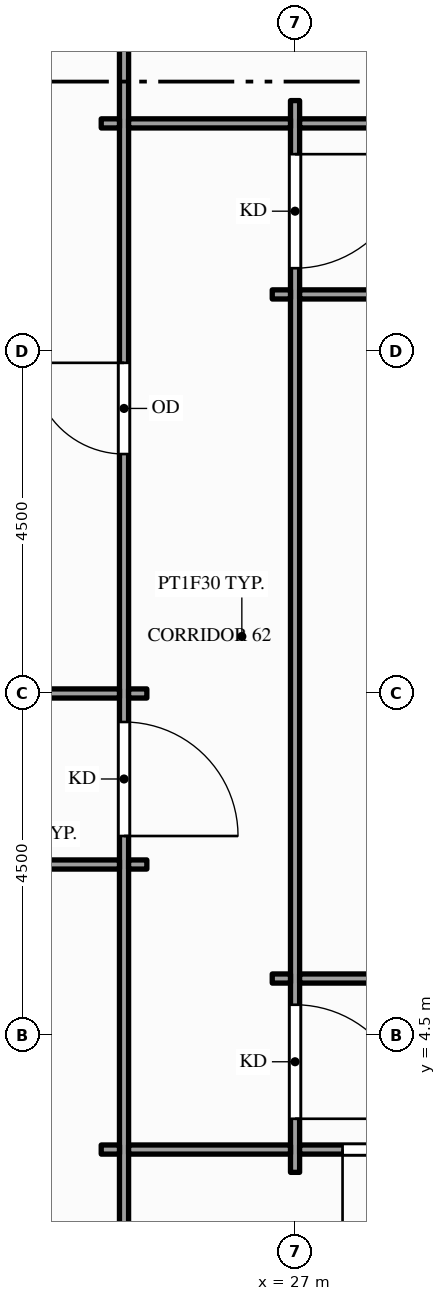
"""IFC4 building model, lengths in metres.
Left out: names, types, materials, properties, quantities, classifications, styles, units other than length and angle.
Written with IfcOpenShell. Run it as: python <this file> out.ifc"""

import sys

from ifc_helpers import new_model, si_unit, direction, frame, frame_2d, origin, place, context, subcontext, project, spatial, rectangle, extrude, element, fill, save


model = new_model("IFC4")
c1 = context("Model", 3, precision=1e-05, world=origin(), true_north=direction((0.0, 1.0)))
c2 = subcontext(c1, "Body", "Model", "MODEL_VIEW")
j1 = project(units=[si_unit("LENGTHUNIT", "METRE"), si_unit("PLANEANGLEUNIT", "RADIAN")], contexts=[c1])
p1 = place(None, origin())
s1 = spatial("IfcSite", under=j1, at=p1, CompositionType="ELEMENT")
p2 = place(p1, origin())
s2 = spatial("IfcBuilding", under=s1, at=p2, CompositionType="ELEMENT")
p3 = place(p2, frame((0.0, 0.0, 215.0)))
s3 = spatial("IfcBuildingStorey", under=s2, at=p3, CompositionType="ELEMENT", Elevation=215.0)
p4 = place(p3, frame((24.75, -1.35, 0.0), z_axis=(0.0, 0.0, 1.0), x_axis=(0.0, 1.0, 0.0)))
e1 = element("IfcWall", 1, at=p4, inside=s3, PredefinedType="PARTITIONING", context=c2, shape_type="SweptSolid", body=[
    extrude(rectangle(XDim=24.101, YDim=0.12, at=frame_2d((12.05, 0.0))), origin(), (0.0, 0.0, 1.0), 2.76),
])
p5 = place(p4, frame((8.475, 0.0, 0.0)))
e2 = element("IfcOpeningElement", 2, at=p5, cuts=e1, PredefinedType="OPENING", context=c2, shape_type="SweptSolid", body=[
    extrude(rectangle(XDim=1.5, YDim=2.1, at=frame_2d((0.75, 1.05))), frame((0.0, 0.07, 0.0), z_axis=(0.0, -1.0, 0.0), x_axis=(1.0, 0.0, 0.0)), (0.0, 0.0, 1.0), 0.14),
])
p6 = place(p4, frame((13.5, 0.0, 0.0)))
e3 = element("IfcOpeningElement", 3, at=p6, cuts=e1, PredefinedType="OPENING", context=c2, shape_type="SweptSolid", body=[
    extrude(rectangle(XDim=1.2, YDim=2.1, at=frame_2d((0.6, 1.05))), frame((0.0, 0.07, 0.0), z_axis=(0.0, -1.0, 0.0), x_axis=(1.0, 0.0, 0.0)), (0.0, 0.0, 1.0), 0.14),
])
p7 = place(p3, frame((27.0, 2.7, 0.0), z_axis=(0.0, 0.0, 1.0), x_axis=(0.0, 1.0, 0.0)))
e4 = element("IfcWall", 4, at=p7, inside=s3, PredefinedType="PARTITIONING", context=c2, shape_type="SweptSolid", body=[
    extrude(rectangle(XDim=14.1, YDim=0.12, at=frame_2d((7.05, 0.0))), origin(), (0.0, 0.0, 1.0), 2.87),
])
p8 = place(p7, frame((0.705, 0.0, 0.0)))
e5 = element("IfcOpeningElement", 5, at=p8, cuts=e4, PredefinedType="OPENING", context=c2, shape_type="SweptSolid", body=[
    extrude(rectangle(XDim=1.5, YDim=2.1, at=frame_2d((0.75, 1.05))), frame((0.0, 0.07, 0.0), z_axis=(0.0, -1.0, 0.0), x_axis=(1.0, 0.0, 0.0)), (0.0, 0.0, 1.0), 0.14),
])
p9 = place(p7, frame((11.895, 0.0, 0.0)))
e6 = element("IfcOpeningElement", 6, at=p9, cuts=e4, PredefinedType="OPENING", context=c2, shape_type="SweptSolid", body=[
    extrude(rectangle(XDim=1.5, YDim=2.1, at=frame_2d((0.75, 1.05))), frame((0.0, 0.07, 0.0), z_axis=(0.0, -1.0, 0.0), x_axis=(1.0, 0.0, 0.0)), (0.0, 0.0, 1.0), 0.14),
])
p10 = place(p3, frame((24.45, 3.0, 0.0), z_axis=(0.0, 0.0, 1.0), x_axis=(1.0, 0.0, 0.0)))
e7 = element("IfcWall", 7, at=p10, inside=s3, PredefinedType="PARTITIONING", context=c2, shape_type="SweptSolid", body=[
    extrude(rectangle(XDim=0.24, YDim=0.12, at=frame_2d((0.12, 0.0))), origin(), (0.0, 0.0, 1.0), 2.76),
])
p11 = place(p3, frame((24.81, 3.0, 0.0), z_axis=(0.0, 0.0, 1.0), x_axis=(1.0, 0.0, 0.0)))
e8 = element("IfcWall", 8, at=p11, inside=s3, PredefinedType="PARTITIONING", context=c2, shape_type="SweptSolid", body=[
    extrude(rectangle(XDim=2.13, YDim=0.12, at=frame_2d((1.065, 0.0))), origin(), (0.0, 0.0, 1.0), 2.76),
])
p12 = place(p3, frame((27.06, 3.0, 0.0), z_axis=(0.0, 0.0, 1.0), x_axis=(1.0, 0.0, 0.0)))
e9 = element("IfcWall", 9, at=p12, inside=s3, PredefinedType="PARTITIONING", context=c2, shape_type="SweptSolid", body=[
    extrude(rectangle(XDim=2.13, YDim=0.12, at=frame_2d((1.065, 0.0))), origin(), (0.0, 0.0, 1.0), 2.87),
])
p13 = place(p12, frame((0.565, 0.0, 0.0)))
e10 = element("IfcOpeningElement", 10, at=p13, cuts=e9, PredefinedType="OPENING", context=c2, shape_type="SweptSolid", body=[
    extrude(rectangle(XDim=1.0, YDim=2.1, at=frame_2d((0.5, 1.05))), frame((0.0, 0.07, 0.0), z_axis=(0.0, -1.0, 0.0), x_axis=(1.0, 0.0, 0.0)), (0.0, 0.0, 1.0), 0.14),
])
p14 = place(p3, frame((26.7, 5.25, 0.0), z_axis=(0.0, 0.0, 1.0), x_axis=(1.0, 0.0, 0.0)))
e11 = element("IfcWall", 11, at=p14, inside=s3, PredefinedType="PARTITIONING", context=c2, shape_type="SweptSolid", body=[
    extrude(rectangle(XDim=0.24, YDim=0.12, at=frame_2d((0.12, 0.0))), origin(), (0.0, 0.0, 1.0), 2.87),
])
p15 = place(p3, frame((27.06, 5.25, 0.0), z_axis=(0.0, 0.0, 1.0), x_axis=(1.0, 0.0, 0.0)))
e12 = element("IfcWall", 12, at=p15, inside=s3, PredefinedType="PARTITIONING", context=c2, shape_type="SweptSolid", body=[
    extrude(rectangle(XDim=4.38, YDim=0.12, at=frame_2d((2.19, 0.0))), origin(), (0.0, 0.0, 1.0), 2.87),
])
p16 = place(p15, frame((1.69, 0.0, 0.0)))
e13 = element("IfcOpeningElement", 13, at=p16, cuts=e12, PredefinedType="OPENING", context=c2, shape_type="SweptSolid", body=[
    extrude(rectangle(XDim=1.0, YDim=2.1, at=frame_2d((0.5, 1.05))), frame((0.0, 0.07, 0.0), z_axis=(0.0, -1.0, 0.0), x_axis=(1.0, 0.0, 0.0)), (0.0, 0.0, 1.0), 0.14),
])
p17 = place(p3, frame((18.06, 6.75, 0.0), z_axis=(0.0, 0.0, 1.0), x_axis=(1.0, 0.0, 0.0)))
e14 = element("IfcWall", 14, at=p17, inside=s3, PredefinedType="PARTITIONING", context=c2, shape_type="SweptSolid", body=[
    extrude(rectangle(XDim=6.63, YDim=0.12, at=frame_2d((3.315, 0.0))), origin(), (0.0, 0.0, 1.0), 2.76),
])
p18 = place(p17, frame((2.865, 0.0, 0.0)))
e15 = element("IfcOpeningElement", 15, at=p18, cuts=e14, PredefinedType="OPENING", context=c2, shape_type="SweptSolid", body=[
    extrude(rectangle(XDim=0.9, YDim=2.1, at=frame_2d((0.45, 1.05))), frame((0.0, 0.07, 0.0), z_axis=(0.0, -1.0, 0.0), x_axis=(1.0, 0.0, 0.0)), (0.0, 0.0, 1.0), 0.14),
])
p19 = place(p3, frame((24.81, 6.75, 0.0), z_axis=(0.0, 0.0, 1.0), x_axis=(1.0, 0.0, 0.0)))
e16 = element("IfcWall", 16, at=p19, inside=s3, PredefinedType="PARTITIONING", context=c2, shape_type="SweptSolid", body=[
    extrude(rectangle(XDim=0.24, YDim=0.12, at=frame_2d((0.12, 0.0))), origin(), (0.0, 0.0, 1.0), 2.76),
])
p20 = place(p3, frame((11.31, 9.0, 0.0), z_axis=(0.0, 0.0, 1.0), x_axis=(1.0, 0.0, 0.0)))
e17 = element("IfcWall", 17, at=p20, inside=s3, PredefinedType="PARTITIONING", context=c2, shape_type="SweptSolid", body=[
    extrude(rectangle(XDim=13.38, YDim=0.12, at=frame_2d((6.69, 0.0))), origin(), (0.0, 0.0, 1.0), 2.76),
])
p21 = place(p20, frame((3.54, 0.0, 0.0)))
e18 = element("IfcOpeningElement", 18, at=p21, cuts=e17, PredefinedType="OPENING", context=c2, shape_type="SweptSolid", body=[
    extrude(rectangle(XDim=1.8, YDim=2.1, at=frame_2d((0.9, 1.05))), frame((0.0, 0.07, 0.0), z_axis=(0.0, -1.0, 0.0), x_axis=(1.0, 0.0, 0.0)), (0.0, 0.0, 1.0), 0.14),
])
p22 = place(p3, frame((24.81, 9.0, 0.0), z_axis=(0.0, 0.0, 1.0), x_axis=(1.0, 0.0, 0.0)))
e19 = element("IfcWall", 19, at=p22, inside=s3, PredefinedType="PARTITIONING", context=c2, shape_type="SweptSolid", body=[
    extrude(rectangle(XDim=0.24, YDim=0.12, at=frame_2d((0.12, 0.0))), origin(), (0.0, 0.0, 1.0), 2.76),
])
p23 = place(p3, frame((26.7, 14.25, 0.0), z_axis=(0.0, 0.0, 1.0), x_axis=(1.0, 0.0, 0.0)))
e20 = element("IfcWall", 20, at=p23, inside=s3, PredefinedType="PARTITIONING", context=c2, shape_type="SweptSolid", body=[
    extrude(rectangle(XDim=0.24, YDim=0.12, at=frame_2d((0.12, 0.0))), origin(), (0.0, 0.0, 1.0), 2.87),
])
p24 = place(p3, frame((27.06, 14.25, 0.0), z_axis=(0.0, 0.0, 1.0), x_axis=(1.0, 0.0, 0.0)))
e21 = element("IfcWall", 21, at=p24, inside=s3, PredefinedType="PARTITIONING", context=c2, shape_type="SweptSolid", body=[
    extrude(rectangle(XDim=4.38, YDim=0.12, at=frame_2d((2.19, 0.0))), origin(), (0.0, 0.0, 1.0), 2.87),
])
p25 = place(p3, frame((24.45, 16.5, 0.0), z_axis=(0.0, 0.0, 1.0), x_axis=(1.0, 0.0, 0.0)))
e22 = element("IfcWall", 22, at=p25, inside=s3, PredefinedType="PARTITIONING", context=c2, shape_type="SweptSolid", body=[
    extrude(rectangle(XDim=0.24, YDim=0.12, at=frame_2d((0.12, 0.0))), origin(), (0.0, 0.0, 1.0), 2.76),
])
p26 = place(p3, frame((24.81, 16.5, 0.0), z_axis=(0.0, 0.0, 1.0), x_axis=(1.0, 0.0, 0.0)))
e23 = element("IfcWall", 23, at=p26, inside=s3, PredefinedType="PARTITIONING", context=c2, shape_type="SweptSolid", body=[
    extrude(rectangle(XDim=2.13, YDim=0.12, at=frame_2d((1.065, 0.0))), origin(), (0.0, 0.0, 1.0), 2.76),
])
p27 = place(p3, frame((27.06, 16.5, 0.0), z_axis=(0.0, 0.0, 1.0), x_axis=(1.0, 0.0, 0.0)))
e24 = element("IfcWall", 24, at=p27, inside=s3, PredefinedType="PARTITIONING", context=c2, shape_type="SweptSolid", body=[
    extrude(rectangle(XDim=13.38, YDim=0.12, at=frame_2d((6.69, 0.0))), origin(), (0.0, 0.0, 1.0), 2.87),
])
p28 = place(p27, frame((5.79, 0.0, 0.0)))
e25 = element("IfcOpeningElement", 25, at=p28, cuts=e24, PredefinedType="OPENING", context=c2, shape_type="SweptSolid", body=[
    extrude(rectangle(XDim=1.8, YDim=2.1, at=frame_2d((0.9, 1.05))), frame((0.0, 0.07, 0.0), z_axis=(0.0, -1.0, 0.0), x_axis=(1.0, 0.0, 0.0)), (0.0, 0.0, 1.0), 0.14),
])
p29 = place(p5, origin())
e26 = element("IfcDoor", 26, at=p29, inside=s3, OperationType="SINGLE_SWING_LEFT", PredefinedType="DOOR", context=c2, shape_type="SweptSolid", body=[
    extrude(rectangle(XDim=1.5, YDim=2.1, at=frame_2d((0.75, 1.05))), frame((0.0, 0.025, 0.0), z_axis=(0.0, -1.0, 0.0), x_axis=(1.0, 0.0, 0.0)), (0.0, 0.0, 1.0), 0.05),
])
fill(e2, e26)
p30 = place(p8, origin())
e27 = element("IfcDoor", 27, at=p30, inside=s3, OperationType="SINGLE_SWING_LEFT", PredefinedType="DOOR", context=c2, shape_type="SweptSolid", body=[
    extrude(rectangle(XDim=1.5, YDim=2.1, at=frame_2d((0.75, 1.05))), frame((0.0, 0.025, 0.0), z_axis=(0.0, -1.0, 0.0), x_axis=(1.0, 0.0, 0.0)), (0.0, 0.0, 1.0), 0.05),
])
fill(e5, e27)
p31 = place(p9, origin())
e28 = element("IfcDoor", 28, at=p31, inside=s3, OperationType="SINGLE_SWING_RIGHT", PredefinedType="DOOR", context=c2, shape_type="SweptSolid", body=[
    extrude(rectangle(XDim=1.5, YDim=2.1, at=frame_2d((0.75, 1.05))), frame((0.0, 0.025, 0.0), z_axis=(0.0, -1.0, 0.0), x_axis=(1.0, 0.0, 0.0)), (0.0, 0.0, 1.0), 0.05),
])
fill(e6, e28)
p32 = place(p13, origin())
e29 = element("IfcDoor", 29, at=p32, inside=s3, OperationType="SINGLE_SWING_LEFT", PredefinedType="DOOR", context=c2, shape_type="SweptSolid", body=[
    extrude(rectangle(XDim=1.0, YDim=2.1, at=frame_2d((0.5, 1.05))), frame((0.0, 0.025, 0.0), z_axis=(0.0, -1.0, 0.0), x_axis=(1.0, 0.0, 0.0)), (0.0, 0.0, 1.0), 0.05),
])
fill(e10, e29)
p33 = place(p6, origin())
e30 = element("IfcDoor", 30, at=p33, inside=s3, OperationType="SINGLE_SWING_RIGHT", PredefinedType="DOOR", context=c2, shape_type="SweptSolid", body=[
    extrude(rectangle(XDim=1.2, YDim=2.1, at=frame_2d((0.6, 1.05))), frame((0.0, 0.025, 0.0), z_axis=(0.0, -1.0, 0.0), x_axis=(1.0, 0.0, 0.0)), (0.0, 0.0, 1.0), 0.05),
])
fill(e3, e30)
save(model, sys.argv[1])
